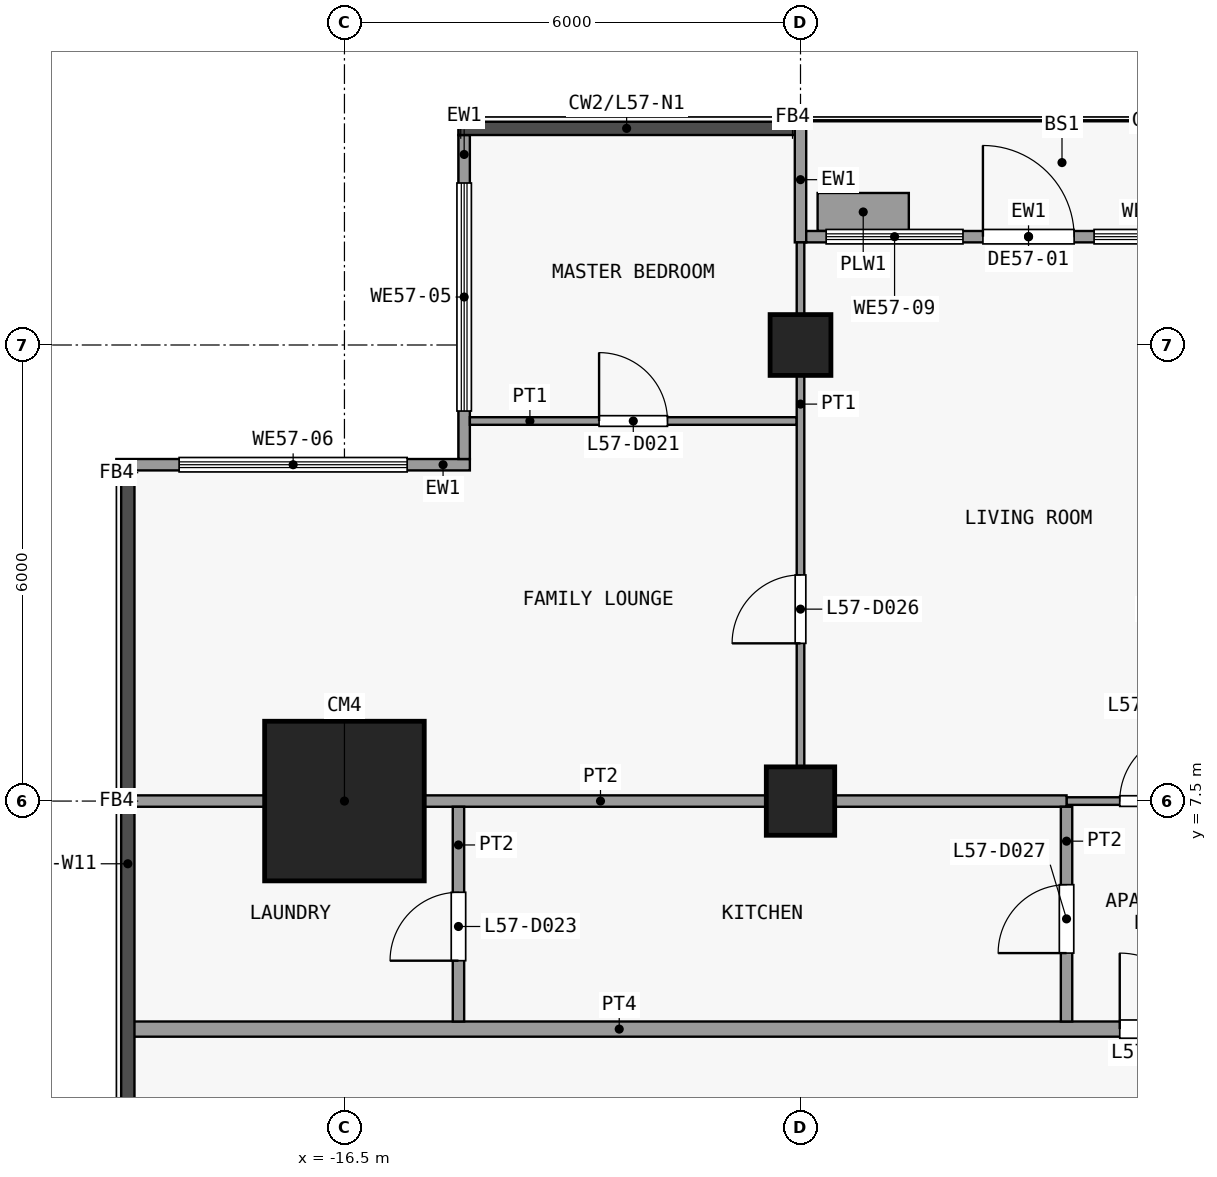
"""IFC4 building model, lengths in metres.
Left out: names, types, materials, properties, quantities, classifications, styles, units other than length and angle.
Written with IfcOpenShell. Run it as: python <this file> out.ifc"""

import sys

from ifc_helpers import new_model, si_unit, direction, frame, frame_2d, origin, origin_2d, place, context, subcontext, project, spatial, rectangle, extrude, element, fill, save


model = new_model("IFC4")
c1 = context("Model", 3, precision=1e-05, world=origin(), true_north=direction((0.0, 1.0)))
c2 = subcontext(c1, "Body", "Model", "MODEL_VIEW")
j1 = project(units=[si_unit("LENGTHUNIT", "METRE"), si_unit("PLANEANGLEUNIT", "RADIAN")], contexts=[c1])
p1 = place(None, origin())
s1 = spatial("IfcSite", under=j1, at=p1, CompositionType="ELEMENT")
p2 = place(p1, origin())
s2 = spatial("IfcBuilding", under=s1, at=p2, CompositionType="ELEMENT")
p3 = place(p2, frame((0.0, 0.0, 226.7)))
s3 = spatial("IfcBuildingStorey", under=s2, at=p3, CompositionType="ELEMENT", Elevation=226.7)
p4 = place(p3, frame((-16.5, 7.5, 0.0), z_axis=(0.0, 0.0, 1.0), x_axis=(1.0, 0.0, 0.0)))
e1 = element("IfcColumn", 1, at=p4, inside=s3, PredefinedType="COLUMN", context=c2, shape_type="SweptSolid", body=[
    extrude(rectangle(XDim=2.1, YDim=2.1, at=origin_2d()), origin(), (0.0, 0.0, 1.0), 3.6),
])
p5 = place(p3, frame((-10.5, 7.5, 0.0), z_axis=(0.0, 0.0, 1.0), x_axis=(1.0, 0.0, 0.0)))
e2 = element("IfcColumn", 2, at=p5, inside=s3, PredefinedType="COLUMN", context=c2, shape_type="SweptSolid", body=[
    extrude(rectangle(XDim=0.9, YDim=0.9, at=origin_2d()), origin(), (0.0, 0.0, 1.0), 3.6),
])
p6 = place(p3, frame((-10.5, 13.5, 0.0), z_axis=(0.0, 0.0, 1.0), x_axis=(1.0, 0.0, 0.0)))
e3 = element("IfcColumn", 3, at=p6, inside=s3, PredefinedType="COLUMN", context=c2, shape_type="SweptSolid", body=[
    extrude(rectangle(XDim=0.8, YDim=0.8, at=origin_2d()), origin(), (0.0, 0.0, 1.0), 3.6),
])
p7 = place(p3, frame((-14.925, 12.0, 0.0), z_axis=(0.0, 0.0, 1.0), x_axis=(0.0, 1.0, 0.0)))
e4 = element("IfcWall", 4, at=p7, inside=s3, PredefinedType="SOLIDWALL", context=c2, shape_type="SweptSolid", body=[
    extrude(rectangle(XDim=4.262, YDim=0.15, at=frame_2d((2.131, 0.0))), origin(), (0.0, 0.0, 1.0), 3.3),
])
p8 = place(p7, frame((0.631, 0.0, 0.9)))
e5 = element("IfcOpeningElement", 5, at=p8, cuts=e4, PredefinedType="OPENING", context=c2, shape_type="SweptSolid", body=[
    extrude(rectangle(XDim=3.0, YDim=2.4, at=frame_2d((1.5, 1.2))), frame((0.0, 0.085, 0.0), z_axis=(0.0, -1.0, 0.0), x_axis=(1.0, 0.0, 0.0)), (0.0, 0.0, 1.0), 0.17),
])
p9 = place(p3, frame((-19.5, 11.925, 0.0), z_axis=(0.0, 0.0, 1.0), x_axis=(1.0, 0.0, 0.0)))
e6 = element("IfcWall", 6, at=p9, inside=s3, PredefinedType="SOLIDWALL", context=c2, shape_type="SweptSolid", body=[
    extrude(rectangle(XDim=4.65, YDim=0.15, at=frame_2d((2.325, 0.0))), origin(), (0.0, 0.0, 1.0), 3.3),
])
p10 = place(p9, frame((0.825, 0.0, 0.9)))
e7 = element("IfcOpeningElement", 7, at=p10, cuts=e6, PredefinedType="OPENING", context=c2, shape_type="SweptSolid", body=[
    extrude(rectangle(XDim=3.0, YDim=2.4, at=frame_2d((1.5, 1.2))), frame((0.0, 0.085, 0.0), z_axis=(0.0, -1.0, 0.0), x_axis=(1.0, 0.0, 0.0)), (0.0, 0.0, 1.0), 0.17),
])
p11 = place(p3, frame((-10.5, 14.85, 0.0), z_axis=(0.0, 0.0, 1.0), x_axis=(0.0, 1.0, 0.0)))
e8 = element("IfcWall", 8, at=p11, inside=s3, PredefinedType="SOLIDWALL", context=c2, shape_type="SweptSolid", body=[
    extrude(rectangle(XDim=1.65, YDim=0.15, at=frame_2d((0.825, 0.0))), origin(), (0.0, 0.0, 1.0), 3.3),
])
p12 = place(p3, frame((-10.425, 14.925, 0.0), z_axis=(0.0, 0.0, 1.0), x_axis=(1.0, 0.0, 0.0)))
e9 = element("IfcWall", 9, at=p12, inside=s3, PredefinedType="SOLIDWALL", context=c2, shape_type="SweptSolid", body=[
    extrude(rectangle(XDim=5.85, YDim=0.15, at=frame_2d((2.925, 0.0))), origin(), (0.0, 0.0, 1.0), 3.3),
])
p13 = place(p12, frame((2.325, 0.0, 0.0)))
e10 = element("IfcOpeningElement", 10, at=p13, cuts=e9, PredefinedType="OPENING", context=c2, shape_type="SweptSolid", body=[
    extrude(rectangle(XDim=1.2, YDim=2.4, at=frame_2d((0.6, 1.2))), frame((0.0, 0.085, 0.0), z_axis=(0.0, -1.0, 0.0), x_axis=(1.0, 0.0, 0.0)), (0.0, 0.0, 1.0), 0.17),
])
p14 = place(p12, frame((0.262, 0.0, 0.9)))
e11 = element("IfcOpeningElement", 11, at=p14, cuts=e9, PredefinedType="OPENING", context=c2, shape_type="SweptSolid", body=[
    extrude(rectangle(XDim=1.8, YDim=2.1, at=frame_2d((0.9, 1.05))), frame((0.0, 0.085, 0.0), z_axis=(0.0, -1.0, 0.0), x_axis=(1.0, 0.0, 0.0)), (0.0, 0.0, 1.0), 0.17),
])
p15 = place(p12, frame((3.788, 0.0, 0.9)))
e12 = element("IfcOpeningElement", 12, at=p15, cuts=e9, PredefinedType="OPENING", context=c2, shape_type="SweptSolid", body=[
    extrude(rectangle(XDim=1.8, YDim=2.1, at=frame_2d((0.9, 1.05))), frame((0.0, 0.085, 0.0), z_axis=(0.0, -1.0, 0.0), x_axis=(1.0, 0.0, 0.0)), (0.0, 0.0, 1.0), 0.17),
])
p16 = place(p3, frame((-10.275, 15.25, 0.0), z_axis=(0.0, 0.0, 1.0), x_axis=(1.0, 0.0, 0.0)))
e13 = element("IfcWall", 13, at=p16, inside=s3, PredefinedType="USERDEFINED", context=c2, shape_type="SweptSolid", body=[
    extrude(rectangle(XDim=1.2, YDim=0.5, at=frame_2d((0.6, 0.0))), origin(), (0.0, 0.0, 1.0), 0.9),
])
p17 = place(p3, frame((-19.35, 4.5, 0.0), z_axis=(0.0, 0.0, 1.0), x_axis=(1.0, 0.0, 0.0)))
e14 = element("IfcWall", 14, at=p17, inside=s3, PredefinedType="PARTITIONING", context=c2, shape_type="SweptSolid", body=[
    extrude(rectangle(XDim=39.6, YDim=0.2, at=frame_2d((19.8, 0.0))), origin(), (0.0, 0.0, 1.0), 3.3),
])
p18 = place(p17, frame((13.05, 0.0, 0.0)))
e15 = element("IfcOpeningElement", 15, at=p18, cuts=e14, PredefinedType="OPENING", context=c2, shape_type="SweptSolid", body=[
    extrude(rectangle(XDim=1.0, YDim=2.1, at=frame_2d((0.5, 1.05))), frame((0.0, 0.11, 0.0), z_axis=(0.0, -1.0, 0.0), x_axis=(1.0, 0.0, 0.0)), (0.0, 0.0, 1.0), 0.22),
])
p19 = place(p17, frame((26.35, 0.0, 0.0)))
e16 = element("IfcOpeningElement", 16, at=p19, cuts=e14, PredefinedType="OPENING", context=c2, shape_type="SweptSolid", body=[
    extrude(rectangle(XDim=0.9, YDim=2.1, at=frame_2d((0.45, 1.05))), frame((0.0, 0.11, 0.0), z_axis=(0.0, -1.0, 0.0), x_axis=(1.0, 0.0, 0.0)), (0.0, 0.0, 1.0), 0.22),
])
p20 = place(p17, frame((32.35, 0.0, 0.0)))
e17 = element("IfcOpeningElement", 17, at=p20, cuts=e14, PredefinedType="OPENING", context=c2, shape_type="SweptSolid", body=[
    extrude(rectangle(XDim=0.9, YDim=2.1, at=frame_2d((0.45, 1.05))), frame((0.0, 0.11, 0.0), z_axis=(0.0, -1.0, 0.0), x_axis=(1.0, 0.0, 0.0)), (0.0, 0.0, 1.0), 0.22),
])
p21 = place(p17, frame((37.25, 0.0, 0.0)))
e18 = element("IfcOpeningElement", 18, at=p21, cuts=e14, PredefinedType="OPENING", context=c2, shape_type="SweptSolid", body=[
    extrude(rectangle(XDim=0.9, YDim=2.1, at=frame_2d((0.45, 1.05))), frame((0.0, 0.11, 0.0), z_axis=(0.0, -1.0, 0.0), x_axis=(1.0, 0.0, 0.0)), (0.0, 0.0, 1.0), 0.22),
])
p22 = place(p3, frame((-7.0, 7.5, 0.0), z_axis=(0.0, 0.0, 1.0), x_axis=(1.0, 0.0, 0.0)))
e19 = element("IfcWall", 19, at=p22, inside=s3, PredefinedType="PARTITIONING", context=c2, shape_type="SweptSolid", body=[
    extrude(rectangle(XDim=2.4, YDim=0.1, at=frame_2d((1.2, 0.0))), origin(), (0.0, 0.0, 1.0), 3.3),
])
p23 = place(p22, frame((0.7, 0.0, 0.0)))
e20 = element("IfcOpeningElement", 20, at=p23, cuts=e19, PredefinedType="OPENING", context=c2, shape_type="SweptSolid", body=[
    extrude(rectangle(XDim=0.9, YDim=2.1, at=frame_2d((0.45, 1.05))), frame((0.0, 0.06, 0.0), z_axis=(0.0, -1.0, 0.0), x_axis=(1.0, 0.0, 0.0)), (0.0, 0.0, 1.0), 0.12),
])
p24 = place(p3, frame((-19.262, 7.5, 0.0), z_axis=(0.0, 0.0, 1.0), x_axis=(1.0, 0.0, 0.0)))
e21 = element("IfcWall", 21, at=p24, inside=s3, PredefinedType="PARTITIONING", context=c2, shape_type="SweptSolid", body=[
    extrude(rectangle(XDim=12.262, YDim=0.15, at=frame_2d((6.131, 0.0))), origin(), (0.0, 0.0, 1.0), 3.3),
])
p25 = place(p3, frame((-14.85, 12.5, 0.0), z_axis=(0.0, 0.0, 1.0), x_axis=(1.0, 0.0, 0.0)))
e22 = element("IfcWall", 22, at=p25, inside=s3, PredefinedType="PARTITIONING", context=c2, shape_type="SweptSolid", body=[
    extrude(rectangle(XDim=4.3, YDim=0.1, at=frame_2d((2.15, 0.0))), origin(), (0.0, 0.0, 1.0), 3.3),
])
p26 = place(p25, frame((1.7, 0.0, 0.0)))
e23 = element("IfcOpeningElement", 23, at=p26, cuts=e22, PredefinedType="OPENING", context=c2, shape_type="SweptSolid", body=[
    extrude(rectangle(XDim=0.9, YDim=2.1, at=frame_2d((0.45, 1.05))), frame((0.0, 0.06, 0.0), z_axis=(0.0, -1.0, 0.0), x_axis=(1.0, 0.0, 0.0)), (0.0, 0.0, 1.0), 0.12),
])
p27 = place(p3, frame((-15.0, 4.6, 0.0), z_axis=(0.0, 0.0, 1.0), x_axis=(0.0, 1.0, 0.0)))
e24 = element("IfcWall", 24, at=p27, inside=s3, PredefinedType="PARTITIONING", context=c2, shape_type="SweptSolid", body=[
    extrude(rectangle(XDim=2.825, YDim=0.15, at=frame_2d((1.413, 0.0))), origin(), (0.0, 0.0, 1.0), 3.3),
])
p28 = place(p27, frame((0.8, 0.0, 0.0)))
e25 = element("IfcOpeningElement", 25, at=p28, cuts=e24, PredefinedType="OPENING", context=c2, shape_type="SweptSolid", body=[
    extrude(rectangle(XDim=0.9, YDim=2.1, at=frame_2d((0.45, 1.05))), frame((0.0, 0.085, 0.0), z_axis=(0.0, -1.0, 0.0), x_axis=(1.0, 0.0, 0.0)), (0.0, 0.0, 1.0), 0.17),
])
p29 = place(p3, frame((-10.5, 7.575, 0.0), z_axis=(0.0, 0.0, 1.0), x_axis=(0.0, 1.0, 0.0)))
e26 = element("IfcWall", 26, at=p29, inside=s3, PredefinedType="PARTITIONING", context=c2, shape_type="SweptSolid", body=[
    extrude(rectangle(XDim=7.275, YDim=0.1, at=frame_2d((3.638, 0.0))), origin(), (0.0, 0.0, 1.0), 3.3),
])
p30 = place(p29, frame((2.0, 0.0, 0.0)))
e27 = element("IfcOpeningElement", 27, at=p30, cuts=e26, PredefinedType="OPENING", context=c2, shape_type="SweptSolid", body=[
    extrude(rectangle(XDim=0.9, YDim=2.1, at=frame_2d((0.45, 1.05))), frame((0.0, 0.06, 0.0), z_axis=(0.0, -1.0, 0.0), x_axis=(1.0, 0.0, 0.0)), (0.0, 0.0, 1.0), 0.12),
])
p31 = place(p3, frame((-7.0, 4.6, 0.0), z_axis=(0.0, 0.0, 1.0), x_axis=(0.0, 1.0, 0.0)))
e28 = element("IfcWall", 28, at=p31, inside=s3, PredefinedType="PARTITIONING", context=c2, shape_type="SweptSolid", body=[
    extrude(rectangle(XDim=2.825, YDim=0.15, at=frame_2d((1.413, 0.0))), origin(), (0.0, 0.0, 1.0), 3.3),
])
p32 = place(p31, frame((0.9, 0.0, 0.0)))
e29 = element("IfcOpeningElement", 29, at=p32, cuts=e28, PredefinedType="OPENING", context=c2, shape_type="SweptSolid", body=[
    extrude(rectangle(XDim=0.9, YDim=2.1, at=frame_2d((0.45, 1.05))), frame((0.0, 0.085, 0.0), z_axis=(0.0, -1.0, 0.0), x_axis=(1.0, 0.0, 0.0)), (0.0, 0.0, 1.0), 0.17),
])
p33 = place(p8, origin())
e30 = element("IfcWindow", 30, at=p33, inside=s3, PartitioningType="SINGLE_PANEL", PredefinedType="WINDOW", context=c2, shape_type="SweptSolid", body=[
    extrude(rectangle(XDim=3.0, YDim=2.4, at=frame_2d((1.5, 1.2))), frame((0.0, 0.03, 0.0), z_axis=(0.0, -1.0, 0.0), x_axis=(1.0, 0.0, 0.0)), (0.0, 0.0, 1.0), 0.06),
])
fill(e5, e30)
p34 = place(p10, origin())
e31 = element("IfcWindow", 31, at=p34, inside=s3, PartitioningType="SINGLE_PANEL", PredefinedType="WINDOW", context=c2, shape_type="SweptSolid", body=[
    extrude(rectangle(XDim=3.0, YDim=2.4, at=frame_2d((1.5, 1.2))), frame((0.0, 0.03, 0.0), z_axis=(0.0, -1.0, 0.0), x_axis=(1.0, 0.0, 0.0)), (0.0, 0.0, 1.0), 0.06),
])
fill(e7, e31)
p35 = place(p13, origin())
e32 = element("IfcDoor", 32, at=p35, inside=s3, OperationType="SINGLE_SWING_LEFT", PredefinedType="DOOR", context=c2, shape_type="SweptSolid", body=[
    extrude(rectangle(XDim=1.2, YDim=2.4, at=frame_2d((0.6, 1.2))), frame((0.0, 0.025, 0.0), z_axis=(0.0, -1.0, 0.0), x_axis=(1.0, 0.0, 0.0)), (0.0, 0.0, 1.0), 0.05),
])
fill(e10, e32)
p36 = place(p14, origin())
e33 = element("IfcWindow", 33, at=p36, inside=s3, PartitioningType="SINGLE_PANEL", PredefinedType="WINDOW", context=c2, shape_type="SweptSolid", body=[
    extrude(rectangle(XDim=1.8, YDim=2.1, at=frame_2d((0.9, 1.05))), frame((0.0, 0.03, 0.0), z_axis=(0.0, -1.0, 0.0), x_axis=(1.0, 0.0, 0.0)), (0.0, 0.0, 1.0), 0.06),
])
fill(e11, e33)
p37 = place(p15, origin())
e34 = element("IfcWindow", 34, at=p37, inside=s3, PartitioningType="SINGLE_PANEL", PredefinedType="WINDOW", context=c2, shape_type="SweptSolid", body=[
    extrude(rectangle(XDim=1.8, YDim=2.1, at=frame_2d((0.9, 1.05))), frame((0.0, 0.03, 0.0), z_axis=(0.0, -1.0, 0.0), x_axis=(1.0, 0.0, 0.0)), (0.0, 0.0, 1.0), 0.06),
])
fill(e12, e34)
p38 = place(p18, origin())
e35 = element("IfcDoor", 35, at=p38, inside=s3, OperationType="SINGLE_SWING_RIGHT", PredefinedType="DOOR", context=c2, shape_type="SweptSolid", body=[
    extrude(rectangle(XDim=1.0, YDim=2.1, at=frame_2d((0.5, 1.05))), frame((0.0, 0.025, 0.0), z_axis=(0.0, -1.0, 0.0), x_axis=(1.0, 0.0, 0.0)), (0.0, 0.0, 1.0), 0.05),
])
fill(e15, e35)
p39 = place(p23, origin())
e36 = element("IfcDoor", 36, at=p39, inside=s3, OperationType="SINGLE_SWING_LEFT", PredefinedType="DOOR", context=c2, shape_type="SweptSolid", body=[
    extrude(rectangle(XDim=0.9, YDim=2.1, at=frame_2d((0.45, 1.05))), frame((0.0, 0.025, 0.0), z_axis=(0.0, -1.0, 0.0), x_axis=(1.0, 0.0, 0.0)), (0.0, 0.0, 1.0), 0.05),
])
fill(e20, e36)
p40 = place(p26, origin())
e37 = element("IfcDoor", 37, at=p40, inside=s3, OperationType="SINGLE_SWING_RIGHT", PredefinedType="DOOR", context=c2, shape_type="SweptSolid", body=[
    extrude(rectangle(XDim=0.9, YDim=2.1, at=frame_2d((0.45, 1.05))), frame((0.0, 0.025, 0.0), z_axis=(0.0, -1.0, 0.0), x_axis=(1.0, 0.0, 0.0)), (0.0, 0.0, 1.0), 0.05),
])
fill(e23, e37)
p41 = place(p28, origin())
e38 = element("IfcDoor", 38, at=p41, inside=s3, OperationType="SINGLE_SWING_RIGHT", PredefinedType="DOOR", context=c2, shape_type="SweptSolid", body=[
    extrude(rectangle(XDim=0.9, YDim=2.1, at=frame_2d((0.45, 1.05))), frame((0.0, 0.025, 0.0), z_axis=(0.0, -1.0, 0.0), x_axis=(1.0, 0.0, 0.0)), (0.0, 0.0, 1.0), 0.05),
])
fill(e25, e38)
p42 = place(p30, origin())
e39 = element("IfcDoor", 39, at=p42, inside=s3, OperationType="SINGLE_SWING_RIGHT", PredefinedType="DOOR", context=c2, shape_type="SweptSolid", body=[
    extrude(rectangle(XDim=0.9, YDim=2.1, at=frame_2d((0.45, 1.05))), frame((0.0, 0.025, 0.0), z_axis=(0.0, -1.0, 0.0), x_axis=(1.0, 0.0, 0.0)), (0.0, 0.0, 1.0), 0.05),
])
fill(e27, e39)
p43 = place(p32, origin())
e40 = element("IfcDoor", 40, at=p43, inside=s3, OperationType="SINGLE_SWING_RIGHT", PredefinedType="DOOR", context=c2, shape_type="SweptSolid", body=[
    extrude(rectangle(XDim=0.9, YDim=2.1, at=frame_2d((0.45, 1.05))), frame((0.0, 0.025, 0.0), z_axis=(0.0, -1.0, 0.0), x_axis=(1.0, 0.0, 0.0)), (0.0, 0.0, 1.0), 0.05),
])
fill(e29, e40)
save(model, sys.argv[1])
